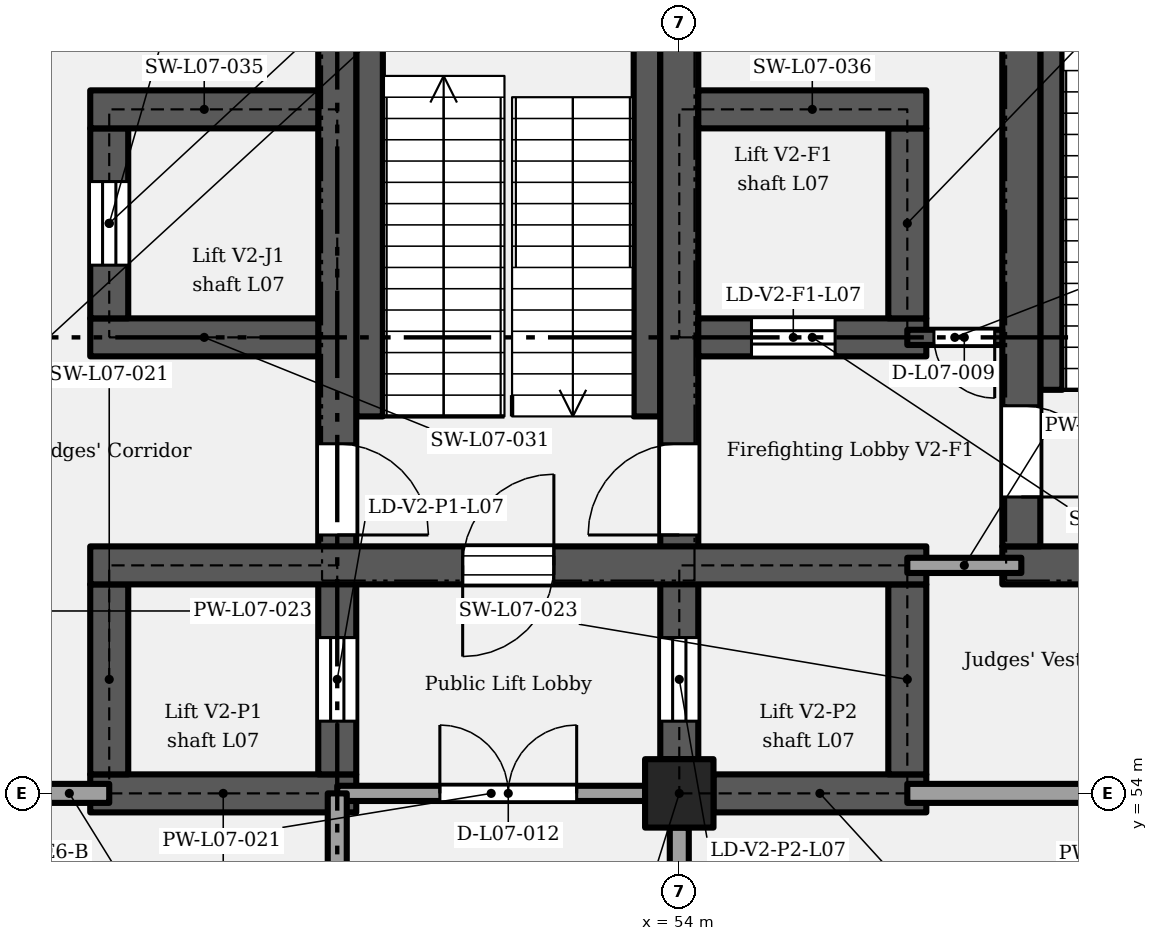
"""IFC4 building model, lengths in metres.
Left out: names, types, materials, properties, quantities, classifications, styles, units other than length and angle.
Written with IfcOpenShell. Run it as: python <this file> out.ifc"""

import sys

from ifc_helpers import new_model, si_unit, direction, frame, frame_2d, origin, origin_2d, place, context, subcontext, project, spatial, rectangle, extrude, element, fill, save


model = new_model("IFC4")
c1 = context("Model", 3, precision=1e-05, world=origin(), true_north=direction((0.0, 1.0)))
c2 = subcontext(c1, "Body", "Model", "MODEL_VIEW")
j1 = project(units=[si_unit("LENGTHUNIT", "METRE"), si_unit("PLANEANGLEUNIT", "RADIAN")], contexts=[c1])
p1 = place(None, origin())
s1 = spatial("IfcSite", under=j1, at=p1, CompositionType="ELEMENT")
p2 = place(p1, origin())
s2 = spatial("IfcBuilding", under=s1, at=p2, CompositionType="ELEMENT")
p3 = place(p2, frame((0.0, 0.0, 39.0)))
s3 = spatial("IfcBuildingStorey", under=s2, at=p3, CompositionType="ELEMENT", Elevation=39.0)
p4 = place(p3, frame((54.0, 54.0, 0.0), z_axis=(0.0, 0.0, 1.0), x_axis=(1.0, 0.0, 0.0)))
e1 = element("IfcColumn", 1, at=p4, inside=s3, PredefinedType="COLUMN", context=c2, shape_type="SweptSolid", body=[
    extrude(rectangle(XDim=0.9, YDim=0.9, at=origin_2d()), origin(), (0.0, 0.0, 1.0), 5.4),
])
p5 = place(p3, frame((46.25, 54.0, 0.0), z_axis=(0.0, 0.0, 1.0), x_axis=(1.0, 0.0, 0.0)))
e2 = element("IfcWall", 2, at=p5, inside=s3, PredefinedType="SHEAR", context=c2, shape_type="SweptSolid", body=[
    extrude(rectangle(XDim=3.5, YDim=0.5, at=frame_2d((1.75, 0.0))), origin(), (0.0, 0.0, 1.0), 5.15),
])
p6 = place(p3, frame((54.45, 54.0, 0.0), z_axis=(0.0, 0.0, 1.0), x_axis=(1.0, 0.0, 0.0)))
e3 = element("IfcWall", 3, at=p6, inside=s3, PredefinedType="SHEAR", context=c2, shape_type="SweptSolid", body=[
    extrude(rectangle(XDim=2.8, YDim=0.5, at=frame_2d((1.4, 0.0))), origin(), (0.0, 0.0, 1.0), 5.15),
])
p7 = place(p3, frame((46.5, 54.25, 0.0), z_axis=(0.0, 0.0, 1.0), x_axis=(0.0, 1.0, 0.0)))
e4 = element("IfcWall", 4, at=p7, inside=s3, PredefinedType="SHEAR", context=c2, shape_type="SweptSolid", body=[
    extrude(rectangle(XDim=2.5, YDim=0.5, at=frame_2d((1.25, 0.0))), origin(), (0.0, 0.0, 1.0), 5.15),
])
p8 = place(p3, frame((49.5, 54.25, 0.0), z_axis=(0.0, 0.0, 1.0), x_axis=(0.0, 1.0, 0.0)))
e5 = element("IfcWall", 5, at=p8, inside=s3, PredefinedType="SHEAR", context=c2, shape_type="SweptSolid", body=[
    extrude(rectangle(XDim=11.5, YDim=0.5, at=frame_2d((5.75, 0.0))), origin(), (0.0, 0.0, 1.0), 5.15),
])
p9 = place(p8, frame((0.7, 0.0, 0.0)))
e6 = element("IfcOpeningElement", 6, at=p9, cuts=e5, PredefinedType="OPENING", context=c2, shape_type="SweptSolid", body=[
    extrude(rectangle(XDim=1.1, YDim=2.1, at=frame_2d((0.55, 1.05))), frame((0.0, 0.26, 0.0), z_axis=(0.0, -1.0, 0.0), x_axis=(1.0, 0.0, 0.0)), (0.0, 0.0, 1.0), 0.52),
])
p10 = place(p8, frame((4.35, 0.0, 0.0), z_axis=(0.0, 0.0, 1.0), x_axis=(-1.0, 0.0, 0.0)))
e7 = element("IfcOpeningElement", 7, at=p10, cuts=e5, PredefinedType="OPENING", context=c2, shape_type="SweptSolid", body=[
    extrude(rectangle(XDim=1.2, YDim=2.1, at=frame_2d((0.6, 1.05))), frame((0.0, 0.26, 0.0), z_axis=(0.0, -1.0, 0.0), x_axis=(1.0, 0.0, 0.0)), (0.0, 0.0, 1.0), 0.52),
])
p11 = place(p3, frame((57.0, 54.25, 0.0), z_axis=(0.0, 0.0, 1.0), x_axis=(0.0, 1.0, 0.0)))
e8 = element("IfcWall", 8, at=p11, inside=s3, PredefinedType="SHEAR", context=c2, shape_type="SweptSolid", body=[
    extrude(rectangle(XDim=2.5, YDim=0.5, at=frame_2d((1.25, 0.0))), origin(), (0.0, 0.0, 1.0), 5.15),
])
p12 = place(p3, frame((54.0, 54.45, 0.0), z_axis=(0.0, 0.0, 1.0), x_axis=(0.0, 1.0, 0.0)))
e9 = element("IfcWall", 9, at=p12, inside=s3, PredefinedType="SHEAR", context=c2, shape_type="SweptSolid", body=[
    extrude(rectangle(XDim=11.1, YDim=0.5, at=frame_2d((5.55, 0.0))), origin(), (0.0, 0.0, 1.0), 5.15),
])
p13 = place(p12, frame((0.5, 0.0, 0.0)))
e10 = element("IfcOpeningElement", 10, at=p13, cuts=e9, PredefinedType="OPENING", context=c2, shape_type="SweptSolid", body=[
    extrude(rectangle(XDim=1.1, YDim=2.1, at=frame_2d((0.55, 1.05))), frame((0.0, 0.26, 0.0), z_axis=(0.0, -1.0, 0.0), x_axis=(1.0, 0.0, 0.0)), (0.0, 0.0, 1.0), 0.52),
])
p14 = place(p12, frame((2.95, 0.0, 0.0)))
e11 = element("IfcOpeningElement", 11, at=p14, cuts=e9, PredefinedType="OPENING", context=c2, shape_type="SweptSolid", body=[
    extrude(rectangle(XDim=1.2, YDim=2.1, at=frame_2d((0.6, 1.05))), frame((0.0, 0.26, 0.0), z_axis=(0.0, -1.0, 0.0), x_axis=(1.0, 0.0, 0.0)), (0.0, 0.0, 1.0), 0.52),
])
p15 = place(p3, frame((46.25, 57.0, 0.0), z_axis=(0.0, 0.0, 1.0), x_axis=(1.0, 0.0, 0.0)))
e12 = element("IfcWall", 12, at=p15, inside=s3, PredefinedType="SHEAR", context=c2, shape_type="SweptSolid", body=[
    extrude(rectangle(XDim=11.0, YDim=0.5, at=frame_2d((5.5, 0.0))), origin(), (0.0, 0.0, 1.0), 5.15),
])
p16 = place(p15, frame((4.9, 0.0, 0.0)))
e13 = element("IfcOpeningElement", 13, at=p16, cuts=e12, PredefinedType="OPENING", context=c2, shape_type="SweptSolid", body=[
    extrude(rectangle(XDim=1.2, YDim=2.1, at=frame_2d((0.6, 1.05))), frame((0.0, 0.26, 0.0), z_axis=(0.0, -1.0, 0.0), x_axis=(1.0, 0.0, 0.0)), (0.0, 0.0, 1.0), 0.52),
])
p17 = place(p3, frame((58.25, 57.0, 0.0), z_axis=(0.0, 0.0, 1.0), x_axis=(1.0, 0.0, 0.0)))
e14 = element("IfcWall", 14, at=p17, inside=s3, PredefinedType="SHEAR", context=c2, shape_type="SweptSolid", body=[
    extrude(rectangle(XDim=5.0, YDim=0.5, at=frame_2d((2.5, 0.0))), origin(), (0.0, 0.0, 1.0), 5.15),
])
p18 = place(p17, frame((2.0, 0.0, 0.0)))
e15 = element("IfcOpeningElement", 15, at=p18, cuts=e14, PredefinedType="OPENING", context=c2, shape_type="SweptSolid", body=[
    extrude(rectangle(XDim=1.0, YDim=2.1, at=frame_2d((0.5, 1.05))), frame((0.0, 0.26, 0.0), z_axis=(0.0, -1.0, 0.0), x_axis=(1.0, 0.0, 0.0)), (0.0, 0.0, 1.0), 0.52),
])
p19 = place(p3, frame((58.5, 57.25, 0.0), z_axis=(0.0, 0.0, 1.0), x_axis=(0.0, 1.0, 0.0)))
e16 = element("IfcWall", 16, at=p19, inside=s3, PredefinedType="SHEAR", context=c2, shape_type="SweptSolid", body=[
    extrude(rectangle(XDim=8.5, YDim=0.5, at=frame_2d((4.25, 0.0))), origin(), (0.0, 0.0, 1.0), 5.15),
])
p20 = place(p19, frame((1.85, 0.0, 0.0), z_axis=(0.0, 0.0, 1.0), x_axis=(-1.0, 0.0, 0.0)))
e17 = element("IfcOpeningElement", 17, at=p20, cuts=e16, PredefinedType="OPENING", context=c2, shape_type="SweptSolid", body=[
    extrude(rectangle(XDim=1.2, YDim=2.1, at=frame_2d((0.6, 1.05))), frame((0.0, 0.26, 0.0), z_axis=(0.0, -1.0, 0.0), x_axis=(1.0, 0.0, 0.0)), (0.0, 0.0, 1.0), 0.52),
])
p21 = place(p3, frame((46.25, 60.0, 0.0), z_axis=(0.0, 0.0, 1.0), x_axis=(1.0, 0.0, 0.0)))
e18 = element("IfcWall", 18, at=p21, inside=s3, PredefinedType="SHEAR", context=c2, shape_type="SweptSolid", body=[
    extrude(rectangle(XDim=3.0, YDim=0.5, at=frame_2d((1.5, 0.0))), origin(), (0.0, 0.0, 1.0), 5.15),
])
p22 = place(p3, frame((54.25, 60.0, 0.0), z_axis=(0.0, 0.0, 1.0), x_axis=(1.0, 0.0, 0.0)))
e19 = element("IfcWall", 19, at=p22, inside=s3, PredefinedType="SHEAR", context=c2, shape_type="SweptSolid", body=[
    extrude(rectangle(XDim=3.0, YDim=0.5, at=frame_2d((1.5, 0.0))), origin(), (0.0, 0.0, 1.0), 5.15),
])
p23 = place(p22, frame((0.7, 0.0, 0.0)))
e20 = element("IfcOpeningElement", 20, at=p23, cuts=e19, PredefinedType="OPENING", context=c2, shape_type="SweptSolid", body=[
    extrude(rectangle(XDim=1.1, YDim=2.1, at=frame_2d((0.55, 1.05))), frame((0.0, 0.26, 0.0), z_axis=(0.0, -1.0, 0.0), x_axis=(1.0, 0.0, 0.0)), (0.0, 0.0, 1.0), 0.52),
])
p24 = place(p3, frame((46.5, 60.25, 0.0), z_axis=(0.0, 0.0, 1.0), x_axis=(0.0, 1.0, 0.0)))
e21 = element("IfcWall", 21, at=p24, inside=s3, PredefinedType="SHEAR", context=c2, shape_type="SweptSolid", body=[
    extrude(rectangle(XDim=2.5, YDim=0.5, at=frame_2d((1.25, 0.0))), origin(), (0.0, 0.0, 1.0), 5.15),
])
p25 = place(p24, frame((0.7, 0.0, 0.0)))
e22 = element("IfcOpeningElement", 22, at=p25, cuts=e21, PredefinedType="OPENING", context=c2, shape_type="SweptSolid", body=[
    extrude(rectangle(XDim=1.1, YDim=2.1, at=frame_2d((0.55, 1.05))), frame((0.0, 0.26, 0.0), z_axis=(0.0, -1.0, 0.0), x_axis=(1.0, 0.0, 0.0)), (0.0, 0.0, 1.0), 0.52),
])
p26 = place(p3, frame((57.0, 60.25, 0.0), z_axis=(0.0, 0.0, 1.0), x_axis=(0.0, 1.0, 0.0)))
e23 = element("IfcWall", 23, at=p26, inside=s3, PredefinedType="SHEAR", context=c2, shape_type="SweptSolid", body=[
    extrude(rectangle(XDim=2.5, YDim=0.5, at=frame_2d((1.25, 0.0))), origin(), (0.0, 0.0, 1.0), 5.15),
])
for number, where, z_axis, x_axis in (
    (24, (46.25, 63.0, 0.0), (0.0, 0.0, 1.0), (1.0, 0.0, 0.0)),
    (25, (54.25, 63.0, 0.0), (0.0, 0.0, 1.0), (1.0, 0.0, 0.0)),
):
    element("IfcWall", number, at=place(p3, frame(where, z_axis=z_axis, x_axis=x_axis)), inside=s3, PredefinedType="SHEAR", context=c2, shape_type="SweptSolid", body=[
        extrude(rectangle(XDim=3.0, YDim=0.5, at=frame_2d((1.5, 0.0))), origin(), (0.0, 0.0, 1.0), 5.15),
    ])
p27 = place(p3, frame((49.375, 57.0, 5.4), z_axis=(0.0, 0.0, 1.0), x_axis=(1.0, 0.0, 0.0)))
e26 = element("IfcWall", 26, at=p27, inside=s3, PredefinedType="SOLIDWALL", context=c2, shape_type="SweptSolid", body=[
    extrude(rectangle(XDim=4.75, YDim=0.25, at=frame_2d((2.375, 0.0))), origin(), (0.0, 0.0, 1.0), 3.1),
])
p28 = place(p27, frame((2.975, 0.0, 0.0), z_axis=(0.0, 0.0, 1.0), x_axis=(-1.0, 0.0, 0.0)))
e27 = element("IfcOpeningElement", 27, at=p28, cuts=e26, PredefinedType="OPENING", context=c2, shape_type="SweptSolid", body=[
    extrude(rectangle(XDim=1.2, YDim=2.1, at=frame_2d((0.6, 1.05))), frame((0.0, 0.135, 0.0), z_axis=(0.0, -1.0, 0.0), x_axis=(1.0, 0.0, 0.0)), (0.0, 0.0, 1.0), 0.27),
])
for number, where, z_axis, x_axis in (
    (28, (49.5, 57.125, 5.4), (0.0, 0.0, 1.0), (0.0, 1.0, 0.0)),
    (29, (54.0, 57.125, 5.4), (0.0, 0.0, 1.0), (0.0, 1.0, 0.0)),
):
    element("IfcWall", number, at=place(p3, frame(where, z_axis=z_axis, x_axis=x_axis)), inside=s3, PredefinedType="SOLIDWALL", context=c2, shape_type="SweptSolid", body=[
        extrude(rectangle(XDim=8.75, YDim=0.25, at=frame_2d((4.375, 0.0))), origin(), (0.0, 0.0, 1.0), 3.1),
    ])
p29 = place(p3, frame((58.375, 57.0, 5.4), z_axis=(0.0, 0.0, 1.0), x_axis=(1.0, 0.0, 0.0)))
e30 = element("IfcWall", 30, at=p29, inside=s3, PredefinedType="SOLIDWALL", context=c2, shape_type="SweptSolid", body=[
    extrude(rectangle(XDim=4.75, YDim=0.25, at=frame_2d((2.375, 0.0))), origin(), (0.0, 0.0, 1.0), 3.1),
])
p30 = place(p29, frame((2.975, 0.0, 0.0), z_axis=(0.0, 0.0, 1.0), x_axis=(-1.0, 0.0, 0.0)))
e31 = element("IfcOpeningElement", 31, at=p30, cuts=e30, PredefinedType="OPENING", context=c2, shape_type="SweptSolid", body=[
    extrude(rectangle(XDim=1.2, YDim=2.1, at=frame_2d((0.6, 1.05))), frame((0.0, 0.135, 0.0), z_axis=(0.0, -1.0, 0.0), x_axis=(1.0, 0.0, 0.0)), (0.0, 0.0, 1.0), 0.27),
])
p31 = place(p3, frame((58.5, 57.125, 5.4), z_axis=(0.0, 0.0, 1.0), x_axis=(0.0, 1.0, 0.0)))
e32 = element("IfcWall", 32, at=p31, inside=s3, PredefinedType="SOLIDWALL", context=c2, shape_type="SweptSolid", body=[
    extrude(rectangle(XDim=8.75, YDim=0.25, at=frame_2d((4.375, 0.0))), origin(), (0.0, 0.0, 1.0), 3.1),
])
p32 = place(p3, frame((45.45, 54.0, 0.0), z_axis=(0.0, 0.0, 1.0), x_axis=(1.0, 0.0, 0.0)))
e33 = element("IfcWall", 33, at=p32, inside=s3, PredefinedType="PARTITIONING", context=c2, shape_type="SweptSolid", body=[
    extrude(rectangle(XDim=1.05, YDim=0.25, at=frame_2d((0.525, 0.0))), origin(), (0.0, 0.0, 1.0), 4.4),
])
p33 = place(p3, frame((49.5, 54.0, 0.0), z_axis=(0.0, 0.0, 1.0), x_axis=(1.0, 0.0, 0.0)))
e34 = element("IfcWall", 34, at=p33, inside=s3, PredefinedType="PARTITIONING", context=c2, shape_type="SweptSolid", body=[
    extrude(rectangle(XDim=4.05, YDim=0.2, at=frame_2d((2.025, 0.0))), origin(), (0.0, 0.0, 1.0), 4.4),
])
p34 = place(p33, frame((1.35, 0.0, 0.0)))
e35 = element("IfcOpeningElement", 35, at=p34, cuts=e34, PredefinedType="OPENING", context=c2, shape_type="SweptSolid", body=[
    extrude(rectangle(XDim=1.8, YDim=2.1, at=frame_2d((0.9, 1.05))), frame((0.0, 0.11, 0.0), z_axis=(0.0, -1.0, 0.0), x_axis=(1.0, 0.0, 0.0)), (0.0, 0.0, 1.0), 0.22),
])
p35 = place(p3, frame((57.0, 54.0, 0.0), z_axis=(0.0, 0.0, 1.0), x_axis=(1.0, 0.0, 0.0)))
e36 = element("IfcWall", 36, at=p35, inside=s3, PredefinedType="PARTITIONING", context=c2, shape_type="SweptSolid", body=[
    extrude(rectangle(XDim=5.55, YDim=0.25, at=frame_2d((2.775, 0.0))), origin(), (0.0, 0.0, 1.0), 4.4),
])
p36 = place(p35, frame((2.5, 0.0, 0.0)))
e37 = element("IfcOpeningElement", 37, at=p36, cuts=e36, PredefinedType="OPENING", context=c2, shape_type="SweptSolid", body=[
    extrude(rectangle(XDim=1.0, YDim=2.1, at=frame_2d((0.5, 1.05))), frame((0.0, 0.135, 0.0), z_axis=(0.0, -1.0, 0.0), x_axis=(1.0, 0.0, 0.0)), (0.0, 0.0, 1.0), 0.27),
])
p37 = place(p3, frame((57.0, 57.0, 0.0), z_axis=(0.0, 0.0, 1.0), x_axis=(1.0, 0.0, 0.0)))
e38 = element("IfcWall", 38, at=p37, inside=s3, PredefinedType="PARTITIONING", context=c2, shape_type="SweptSolid", body=[
    extrude(rectangle(XDim=1.5, YDim=0.2, at=frame_2d((0.75, 0.0))), origin(), (0.0, 0.0, 1.0), 5.15),
])
p38 = place(p3, frame((57.0, 60.0, 0.0), z_axis=(0.0, 0.0, 1.0), x_axis=(1.0, 0.0, 0.0)))
e39 = element("IfcWall", 39, at=p38, inside=s3, PredefinedType="SHEAR", context=c2, shape_type="SweptSolid", body=[
    extrude(rectangle(XDim=1.25, YDim=0.2, at=frame_2d((0.625, 0.0))), origin(), (0.0, 0.0, 1.0), 5.15),
])
p39 = place(p38, frame((1.15, 0.0, 0.0), z_axis=(0.0, 0.0, 1.0), x_axis=(-1.0, 0.0, 0.0)))
e40 = element("IfcOpeningElement", 40, at=p39, cuts=e39, PredefinedType="OPENING", context=c2, shape_type="SweptSolid", body=[
    extrude(rectangle(XDim=0.8, YDim=2.0, at=frame_2d((0.4, 1.0))), frame((0.0, 0.11, 0.0), z_axis=(0.0, -1.0, 0.0), x_axis=(1.0, 0.0, 0.0)), (0.0, 0.0, 1.0), 0.22),
])
p40 = place(p3, frame((49.5, 37.5, 0.0), z_axis=(0.0, 0.0, 1.0), x_axis=(0.0, 1.0, 0.0)))
e41 = element("IfcWall", 41, at=p40, inside=s3, PredefinedType="PARTITIONING", context=c2, shape_type="SweptSolid", body=[
    extrude(rectangle(XDim=16.5, YDim=0.25, at=frame_2d((8.25, 0.0))), origin(), (0.0, 0.0, 1.0), 5.15),
])
p41 = place(p40, frame((3.9, 0.0, 0.0), z_axis=(0.0, 0.0, 1.0), x_axis=(-1.0, 0.0, 0.0)))
e42 = element("IfcOpeningElement", 42, at=p41, cuts=e41, PredefinedType="OPENING", context=c2, shape_type="SweptSolid", body=[
    extrude(rectangle(XDim=1.8, YDim=2.4, at=frame_2d((0.9, 1.2))), frame((0.0, 0.135, 0.0), z_axis=(0.0, -1.0, 0.0), x_axis=(1.0, 0.0, 0.0)), (0.0, 0.0, 1.0), 0.27),
])
p42 = place(p40, frame((14.9, 0.0, 0.0), z_axis=(0.0, 0.0, 1.0), x_axis=(-1.0, 0.0, 0.0)))
e43 = element("IfcOpeningElement", 43, at=p42, cuts=e41, PredefinedType="OPENING", context=c2, shape_type="SweptSolid", body=[
    extrude(rectangle(XDim=1.8, YDim=2.4, at=frame_2d((0.9, 1.2))), frame((0.0, 0.135, 0.0), z_axis=(0.0, -1.0, 0.0), x_axis=(1.0, 0.0, 0.0)), (0.0, 0.0, 1.0), 0.27),
])
p43 = place(p3, frame((54.0, 43.5, 0.0), z_axis=(0.0, 0.0, 1.0), x_axis=(0.0, 1.0, 0.0)))
e44 = element("IfcWall", 44, at=p43, inside=s3, PredefinedType="PARTITIONING", context=c2, shape_type="SweptSolid", body=[
    extrude(rectangle(XDim=10.05, YDim=0.25, at=frame_2d((5.025, 0.0))), origin(), (0.0, 0.0, 1.0), 4.2),
])
p44 = place(p43, frame((3.0, 0.0, 0.0), z_axis=(0.0, 0.0, 1.0), x_axis=(-1.0, 0.0, 0.0)))
e45 = element("IfcOpeningElement", 45, at=p44, cuts=e44, PredefinedType="OPENING", context=c2, shape_type="SweptSolid", body=[
    extrude(rectangle(XDim=1.8, YDim=2.4, at=frame_2d((0.9, 1.2))), frame((0.0, 0.135, 0.0), z_axis=(0.0, -1.0, 0.0), x_axis=(1.0, 0.0, 0.0)), (0.0, 0.0, 1.0), 0.27),
])
p45 = place(p43, frame((8.9, 0.0, 0.0), z_axis=(0.0, 0.0, 1.0), x_axis=(-1.0, 0.0, 0.0)))
e46 = element("IfcOpeningElement", 46, at=p45, cuts=e44, PredefinedType="OPENING", context=c2, shape_type="SweptSolid", body=[
    extrude(rectangle(XDim=1.8, YDim=2.4, at=frame_2d((0.9, 1.2))), frame((0.0, 0.135, 0.0), z_axis=(0.0, -1.0, 0.0), x_axis=(1.0, 0.0, 0.0)), (0.0, 0.0, 1.0), 0.27),
])
p46 = place(p3, frame((49.925, 58.96, 0.0), z_axis=(0.0, 0.0, 1.0), x_axis=(0.0, 1.0, 0.0)))
e47 = element("IfcWall", 47, at=p46, inside=s3, PredefinedType="SHEAR", context=c2, shape_type="SweptSolid", body=[
    extrude(rectangle(XDim=6.79, YDim=0.35, at=frame_2d((3.395, 0.0))), origin(), (0.0, 0.0, 1.0), 2.587),
])
p47 = place(p3, frame((53.575, 58.96, 0.0), z_axis=(0.0, 0.0, 1.0), x_axis=(0.0, 1.0, 0.0)))
e48 = element("IfcWall", 48, at=p47, inside=s3, PredefinedType="SHEAR", context=c2, shape_type="SweptSolid", body=[
    extrude(rectangle(XDim=6.79, YDim=0.35, at=frame_2d((3.395, 0.0))), origin(), (0.0, 0.0, 1.0), 5.15),
])
p48 = place(p3, frame((58.895, 59.31, 0.0), z_axis=(0.0, 0.0, 1.0), x_axis=(0.0, 1.0, 0.0)))
e49 = element("IfcWall", 49, at=p48, inside=s3, PredefinedType="SHEAR", context=c2, shape_type="SweptSolid", body=[
    extrude(rectangle(XDim=6.44, YDim=0.29, at=frame_2d((3.22, 0.0))), origin(), (0.0, 0.0, 1.0), 2.587),
])
p49 = place(p28, origin())
e50 = element("IfcDoor", 50, at=p49, inside=s3, OperationType="SINGLE_SWING_LEFT", PredefinedType="DOOR", context=c2, shape_type="SweptSolid", body=[
    extrude(rectangle(XDim=1.2, YDim=2.1, at=frame_2d((0.6, 1.05))), frame((0.0, 0.025, 0.0), z_axis=(0.0, -1.0, 0.0), x_axis=(1.0, 0.0, 0.0)), (0.0, 0.0, 1.0), 0.05),
])
fill(e27, e50)
p50 = place(p9, origin())
e51 = element("IfcDoor", 51, at=p50, inside=s3, OperationType="SLIDING_TO_LEFT", PredefinedType="DOOR", context=c2, shape_type="SweptSolid", body=[
    extrude(rectangle(XDim=1.1, YDim=2.1, at=frame_2d((0.55, 1.05))), frame((0.0, 0.025, 0.0), z_axis=(0.0, -1.0, 0.0), x_axis=(1.0, 0.0, 0.0)), (0.0, 0.0, 1.0), 0.05),
])
fill(e6, e51)
p51 = place(p13, origin())
e52 = element("IfcDoor", 52, at=p51, inside=s3, OperationType="SLIDING_TO_LEFT", PredefinedType="DOOR", context=c2, shape_type="SweptSolid", body=[
    extrude(rectangle(XDim=1.1, YDim=2.1, at=frame_2d((0.55, 1.05))), frame((0.0, 0.025, 0.0), z_axis=(0.0, -1.0, 0.0), x_axis=(1.0, 0.0, 0.0)), (0.0, 0.0, 1.0), 0.05),
])
fill(e10, e52)
p52 = place(p16, origin())
e53 = element("IfcDoor", 53, at=p52, inside=s3, OperationType="SINGLE_SWING_RIGHT", PredefinedType="DOOR", context=c2, shape_type="SweptSolid", body=[
    extrude(rectangle(XDim=1.2, YDim=2.1, at=frame_2d((0.6, 1.05))), frame((0.0, 0.025, 0.0), z_axis=(0.0, -1.0, 0.0), x_axis=(1.0, 0.0, 0.0)), (0.0, 0.0, 1.0), 0.05),
])
fill(e13, e53)
p53 = place(p23, origin())
e54 = element("IfcDoor", 54, at=p53, inside=s3, OperationType="SLIDING_TO_LEFT", PredefinedType="DOOR", context=c2, shape_type="SweptSolid", body=[
    extrude(rectangle(XDim=1.1, YDim=2.1, at=frame_2d((0.55, 1.05))), frame((0.0, 0.025, 0.0), z_axis=(0.0, -1.0, 0.0), x_axis=(1.0, 0.0, 0.0)), (0.0, 0.0, 1.0), 0.05),
])
fill(e20, e54)
p54 = place(p14, origin())
e55 = element("IfcDoor", 55, at=p54, inside=s3, OperationType="SINGLE_SWING_LEFT", PredefinedType="DOOR", context=c2, shape_type="SweptSolid", body=[
    extrude(rectangle(XDim=1.2, YDim=2.1, at=frame_2d((0.6, 1.05))), frame((0.0, 0.025, 0.0), z_axis=(0.0, -1.0, 0.0), x_axis=(1.0, 0.0, 0.0)), (0.0, 0.0, 1.0), 0.05),
])
fill(e11, e55)
p55 = place(p20, origin())
e56 = element("IfcDoor", 56, at=p55, inside=s3, OperationType="SINGLE_SWING_RIGHT", PredefinedType="DOOR", context=c2, shape_type="SweptSolid", body=[
    extrude(rectangle(XDim=1.2, YDim=2.1, at=frame_2d((0.6, 1.05))), frame((0.0, 0.025, 0.0), z_axis=(0.0, -1.0, 0.0), x_axis=(1.0, 0.0, 0.0)), (0.0, 0.0, 1.0), 0.05),
])
fill(e17, e56)
p56 = place(p39, origin())
e57 = element("IfcDoor", 57, at=p56, inside=s3, OperationType="SINGLE_SWING_LEFT", PredefinedType="DOOR", context=c2, shape_type="SweptSolid", body=[
    extrude(rectangle(XDim=0.8, YDim=2.0, at=frame_2d((0.4, 1.0))), frame((0.0, 0.025, 0.0), z_axis=(0.0, -1.0, 0.0), x_axis=(1.0, 0.0, 0.0)), (0.0, 0.0, 1.0), 0.05),
])
fill(e40, e57)
p57 = place(p25, origin())
e58 = element("IfcDoor", 58, at=p57, inside=s3, OperationType="SLIDING_TO_LEFT", PredefinedType="DOOR", context=c2, shape_type="SweptSolid", body=[
    extrude(rectangle(XDim=1.1, YDim=2.1, at=frame_2d((0.55, 1.05))), frame((0.0, 0.025, 0.0), z_axis=(0.0, -1.0, 0.0), x_axis=(1.0, 0.0, 0.0)), (0.0, 0.0, 1.0), 0.05),
])
fill(e22, e58)
p58 = place(p10, origin())
e59 = element("IfcDoor", 59, at=p58, inside=s3, OperationType="SINGLE_SWING_RIGHT", PredefinedType="DOOR", context=c2, shape_type="SweptSolid", body=[
    extrude(rectangle(XDim=1.2, YDim=2.1, at=frame_2d((0.6, 1.05))), frame((0.0, 0.025, 0.0), z_axis=(0.0, -1.0, 0.0), x_axis=(1.0, 0.0, 0.0)), (0.0, 0.0, 1.0), 0.05),
])
fill(e7, e59)
p59 = place(p34, origin())
e60 = element("IfcDoor", 60, at=p59, inside=s3, OperationType="DOUBLE_DOOR_SINGLE_SWING", PredefinedType="DOOR", context=c2, shape_type="SweptSolid", body=[
    extrude(rectangle(XDim=1.8, YDim=2.1, at=frame_2d((0.9, 1.05))), frame((0.0, 0.025, 0.0), z_axis=(0.0, -1.0, 0.0), x_axis=(1.0, 0.0, 0.0)), (0.0, 0.0, 1.0), 0.05),
])
fill(e35, e60)
save(model, sys.argv[1])
